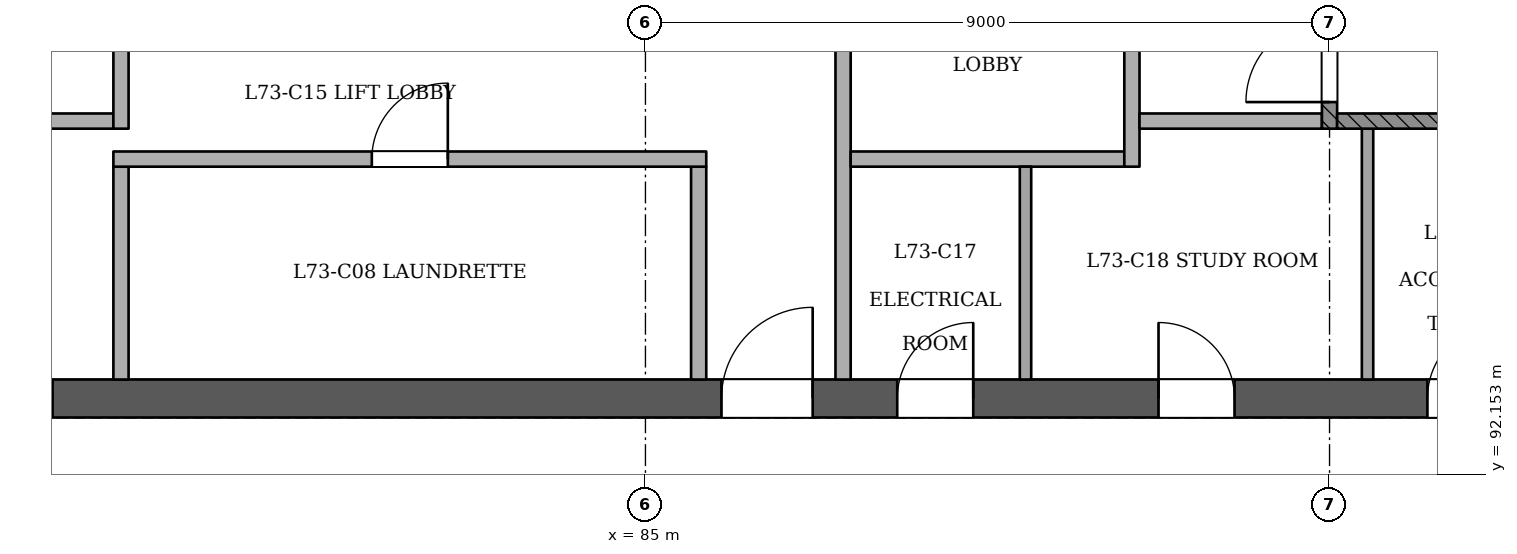
"""IFC4 building model, lengths in metres.
Left out: names, types, materials, properties, quantities, classifications, styles, units other than length and angle.
Written with IfcOpenShell. Run it as: python <this file> out.ifc"""

import sys

from ifc_helpers import new_model, si_unit, direction, frame, frame_2d, origin, place, context, subcontext, project, spatial, rectangle, extrude, element, fill, save


model = new_model("IFC4")
c1 = context("Model", 3, precision=1e-05, world=origin(), true_north=direction((0.0, 1.0)))
c2 = subcontext(c1, "Body", "Model", "MODEL_VIEW")
j1 = project(units=[si_unit("LENGTHUNIT", "METRE"), si_unit("PLANEANGLEUNIT", "RADIAN")], contexts=[c1])
p1 = place(None, origin())
s1 = spatial("IfcSite", under=j1, at=p1, CompositionType="ELEMENT")
p2 = place(p1, origin())
s2 = spatial("IfcBuilding", under=s1, at=p2, CompositionType="ELEMENT")
p3 = place(p2, frame((0.0, 0.0, 282.4)))
s3 = spatial("IfcBuildingStorey", under=s2, at=p3, CompositionType="ELEMENT", Elevation=282.4)
p4 = place(p3, frame((72.75, 93.15, 0.0), z_axis=(0.0, 0.0, 1.0), x_axis=(1.0, 0.0, 0.0)))
e1 = element("IfcWall", 1, at=p4, inside=s3, PredefinedType="SHEAR", context=c2, shape_type="SweptSolid", body=[
    extrude(rectangle(XDim=24.75, YDim=0.5, at=frame_2d((12.375, 0.0))), origin(), (0.0, 0.0, 1.0), 3.6),
])
p5 = place(p4, frame((1.05, 0.0, 0.0)))
e2 = element("IfcOpeningElement", 2, at=p5, cuts=e1, PredefinedType="OPENING", context=c2, shape_type="SweptSolid", body=[
    extrude(rectangle(XDim=1.2, YDim=2.1, at=frame_2d((0.6, 1.05))), frame((0.0, 0.26, 0.0), z_axis=(0.0, -1.0, 0.0), x_axis=(1.0, 0.0, 0.0)), (0.0, 0.0, 1.0), 0.521),
])
p6 = place(p4, frame((3.25, 0.0, 0.0)))
e3 = element("IfcOpeningElement", 3, at=p6, cuts=e1, PredefinedType="OPENING", context=c2, shape_type="SweptSolid", body=[
    extrude(rectangle(XDim=1.2, YDim=2.1, at=frame_2d((0.6, 1.05))), frame((0.0, 0.26, 0.0), z_axis=(0.0, -1.0, 0.0), x_axis=(1.0, 0.0, 0.0)), (0.0, 0.0, 1.0), 0.521),
])
p7 = place(p4, frame((13.25, 0.0, 0.0)))
e4 = element("IfcOpeningElement", 4, at=p7, cuts=e1, PredefinedType="OPENING", context=c2, shape_type="SweptSolid", body=[
    extrude(rectangle(XDim=1.2, YDim=2.1, at=frame_2d((0.6, 1.05))), frame((0.0, 0.26, 0.0), z_axis=(0.0, -1.0, 0.0), x_axis=(1.0, 0.0, 0.0)), (0.0, 0.0, 1.0), 0.521),
])
p8 = place(p4, frame((15.562, 0.0, 0.0)))
e5 = element("IfcOpeningElement", 5, at=p8, cuts=e1, PredefinedType="OPENING", context=c2, shape_type="SweptSolid", body=[
    extrude(rectangle(XDim=1.0, YDim=2.1, at=frame_2d((0.5, 1.05))), frame((0.0, 0.26, 0.0), z_axis=(0.0, -1.0, 0.0), x_axis=(1.0, 0.0, 0.0)), (0.0, 0.0, 1.0), 0.521),
])
p9 = place(p4, frame((19.0, 0.0, 0.0)))
e6 = element("IfcOpeningElement", 6, at=p9, cuts=e1, PredefinedType="OPENING", context=c2, shape_type="SweptSolid", body=[
    extrude(rectangle(XDim=1.0, YDim=2.1, at=frame_2d((0.5, 1.05))), frame((0.0, 0.26, 0.0), z_axis=(0.0, -1.0, 0.0), x_axis=(1.0, 0.0, 0.0)), (0.0, 0.0, 1.0), 0.521),
])
p10 = place(p4, frame((22.538, 0.0, 0.0)))
e7 = element("IfcOpeningElement", 7, at=p10, cuts=e1, PredefinedType="OPENING", context=c2, shape_type="SweptSolid", body=[
    extrude(rectangle(XDim=1.0, YDim=2.1, at=frame_2d((0.5, 1.05))), frame((0.0, 0.26, 0.0), z_axis=(0.0, -1.0, 0.0), x_axis=(1.0, 0.0, 0.0)), (0.0, 0.0, 1.0), 0.521),
])
for number, where, z_axis, x_axis in (
    (8, (78.1, 93.4, 0.0), (0.0, 0.0, 1.0), (0.0, 1.0, 0.0)),
    (9, (85.7, 93.4, 0.0), (0.0, 0.0, 1.0), (0.0, 1.0, 0.0)),
):
    element("IfcWall", number, at=place(p3, frame(where, z_axis=z_axis, x_axis=x_axis)), inside=s3, PredefinedType="PARTITIONING", context=c2, shape_type="SweptSolid", body=[
        extrude(rectangle(XDim=2.8, YDim=0.2, at=frame_2d((1.4, 0.0))), origin(), (0.0, 0.0, 1.0), 3.3),
    ])
p11 = place(p3, frame((87.6, 93.4, 0.0), z_axis=(0.0, 0.0, 1.0), x_axis=(0.0, 1.0, 0.0)))
e10 = element("IfcWall", 10, at=p11, inside=s3, PredefinedType="PARTITIONING", context=c2, shape_type="SweptSolid", body=[
    extrude(rectangle(XDim=7.0, YDim=0.2, at=frame_2d((3.5, 0.0))), origin(), (0.0, 0.0, 1.0), 3.3),
])
p12 = place(p11, frame((4.45, 0.0, 0.0)))
e11 = element("IfcOpeningElement", 11, at=p12, cuts=e10, PredefinedType="OPENING", context=c2, shape_type="SweptSolid", body=[
    extrude(rectangle(XDim=1.1, YDim=2.1, at=frame_2d((0.55, 1.05))), frame((0.0, 0.11, 0.0), z_axis=(0.0, -1.0, 0.0), x_axis=(1.0, 0.0, 0.0)), (0.0, 0.0, 1.0), 0.221),
])
p13 = place(p3, frame((90.0, 93.4, 0.0), z_axis=(0.0, 0.0, 1.0), x_axis=(0.0, 1.0, 0.0)))
e12 = element("IfcWall", 12, at=p13, inside=s3, PredefinedType="PARTITIONING", context=c2, shape_type="SweptSolid", body=[
    extrude(rectangle(XDim=2.8, YDim=0.15, at=frame_2d((1.4, 0.0))), origin(), (0.0, 0.0, 1.0), 3.3),
])
p14 = place(p3, frame((94.5, 93.4, 0.0), z_axis=(0.0, 0.0, 1.0), x_axis=(0.0, 1.0, 0.0)))
e13 = element("IfcWall", 13, at=p14, inside=s3, PredefinedType="PARTITIONING", context=c2, shape_type="SweptSolid", body=[
    extrude(rectangle(XDim=3.3, YDim=0.15, at=frame_2d((1.65, 0.0))), origin(), (0.0, 0.0, 1.0), 3.3),
])
p15 = place(p3, frame((78.0, 96.3, 0.0), z_axis=(0.0, 0.0, 1.0), x_axis=(1.0, 0.0, 0.0)))
e14 = element("IfcWall", 14, at=p15, inside=s3, PredefinedType="PARTITIONING", context=c2, shape_type="SweptSolid", body=[
    extrude(rectangle(XDim=7.8, YDim=0.2, at=frame_2d((3.9, 0.0))), origin(), (0.0, 0.0, 1.0), 3.3),
])
p16 = place(p15, frame((3.4, 0.0, 0.0)))
e15 = element("IfcOpeningElement", 15, at=p16, cuts=e14, PredefinedType="OPENING", context=c2, shape_type="SweptSolid", body=[
    extrude(rectangle(XDim=1.0, YDim=2.1, at=frame_2d((0.5, 1.05))), frame((0.0, 0.11, 0.0), z_axis=(0.0, -1.0, 0.0), x_axis=(1.0, 0.0, 0.0)), (0.0, 0.0, 1.0), 0.221),
])
p17 = place(p3, frame((87.7, 96.3, 0.0), z_axis=(0.0, 0.0, 1.0), x_axis=(1.0, 0.0, 0.0)))
e16 = element("IfcWall", 16, at=p17, inside=s3, PredefinedType="PARTITIONING", context=c2, shape_type="SweptSolid", body=[
    extrude(rectangle(XDim=3.6, YDim=0.2, at=frame_2d((1.8, 0.0))), origin(), (0.0, 0.0, 1.0), 3.3),
])
p18 = place(p3, frame((91.4, 96.2, 0.0), z_axis=(0.0, 0.0, 1.0), x_axis=(0.0, 1.0, 0.0)))
e17 = element("IfcWall", 17, at=p18, inside=s3, PredefinedType="PARTITIONING", context=c2, shape_type="SweptSolid", body=[
    extrude(rectangle(XDim=4.2, YDim=0.2, at=frame_2d((2.1, 0.0))), origin(), (0.0, 0.0, 1.0), 3.3),
])
p19 = place(p18, frame((2.45, 0.0, 0.0)))
e18 = element("IfcOpeningElement", 18, at=p19, cuts=e17, PredefinedType="OPENING", context=c2, shape_type="SweptSolid", body=[
    extrude(rectangle(XDim=1.1, YDim=2.1, at=frame_2d((0.55, 1.05))), frame((0.0, 0.11, 0.0), z_axis=(0.0, -1.0, 0.0), x_axis=(1.0, 0.0, 0.0)), (0.0, 0.0, 1.0), 0.221),
])
p20 = place(p3, frame((76.1, 96.8, 0.0), z_axis=(0.0, 0.0, 1.0), x_axis=(1.0, 0.0, 0.0)))
e19 = element("IfcWall", 19, at=p20, inside=s3, PredefinedType="PARTITIONING", context=c2, shape_type="SweptSolid", body=[
    extrude(rectangle(XDim=1.9, YDim=0.2, at=frame_2d((0.95, 0.0))), origin(), (0.0, 0.0, 1.0), 3.3),
])
p21 = place(p3, frame((78.1, 96.7, 0.0), z_axis=(0.0, 0.0, 1.0), x_axis=(0.0, 1.0, 0.0)))
e20 = element("IfcWall", 20, at=p21, inside=s3, PredefinedType="PARTITIONING", context=c2, shape_type="SweptSolid", body=[
    extrude(rectangle(XDim=3.7, YDim=0.2, at=frame_2d((1.85, 0.0))), origin(), (0.0, 0.0, 1.0), 3.3),
])
p22 = place(p21, frame((1.95, 0.0, 0.0)))
e21 = element("IfcOpeningElement", 21, at=p22, cuts=e20, PredefinedType="OPENING", context=c2, shape_type="SweptSolid", body=[
    extrude(rectangle(XDim=1.1, YDim=2.1, at=frame_2d((0.55, 1.05))), frame((0.0, 0.11, 0.0), z_axis=(0.0, -1.0, 0.0), x_axis=(1.0, 0.0, 0.0)), (0.0, 0.0, 1.0), 0.221),
])
p23 = place(p3, frame((91.5, 96.8, 0.0), z_axis=(0.0, 0.0, 1.0), x_axis=(1.0, 0.0, 0.0)))
e22 = element("IfcWall", 22, at=p23, inside=s3, PredefinedType="PARTITIONING", context=c2, shape_type="SweptSolid", body=[
    extrude(rectangle(XDim=2.4, YDim=0.2, at=frame_2d((1.2, 0.0))), origin(), (0.0, 0.0, 1.0), 3.3),
])
p24 = place(p3, frame((94.0, 96.7, 0.0), z_axis=(0.0, 0.0, 1.0), x_axis=(0.0, 1.0, 0.0)))
e23 = element("IfcWall", 23, at=p24, inside=s3, PredefinedType="SOLIDWALL", context=c2, shape_type="SweptSolid", body=[
    extrude(rectangle(XDim=3.7, YDim=0.2, at=frame_2d((1.85, 0.0))), origin(), (0.0, 0.0, 1.0), 3.3),
])
p25 = place(p24, frame((0.35, 0.0, 0.0)))
e24 = element("IfcOpeningElement", 24, at=p25, cuts=e23, PredefinedType="OPENING", context=c2, shape_type="SweptSolid", body=[
    extrude(rectangle(XDim=1.1, YDim=2.1, at=frame_2d((0.55, 1.05))), frame((0.0, 0.11, 0.0), z_axis=(0.0, -1.0, 0.0), x_axis=(1.0, 0.0, 0.0)), (0.0, 0.0, 1.0), 0.221),
])
p26 = place(p3, frame((94.1, 96.8, 0.0), z_axis=(0.0, 0.0, 1.0), x_axis=(1.0, 0.0, 0.0)))
e25 = element("IfcWall", 25, at=p26, inside=s3, PredefinedType="SOLIDWALL", context=c2, shape_type="SweptSolid", body=[
    extrude(rectangle(XDim=2.9, YDim=0.2, at=frame_2d((1.45, 0.0))), origin(), (0.0, 0.0, 1.0), 3.3),
])
p27 = place(p25, origin())
e26 = element("IfcDoor", 26, at=p27, inside=s3, OperationType="SINGLE_SWING_LEFT", PredefinedType="NOTDEFINED", context=c2, shape_type="SweptSolid", body=[
    extrude(rectangle(XDim=1.1, YDim=2.1, at=frame_2d((0.55, 1.05))), frame((0.0, 0.025, 0.0), z_axis=(0.0, -1.0, 0.0), x_axis=(1.0, 0.0, 0.0)), (0.0, 0.0, 1.0), 0.05),
])
fill(e24, e26)
p28 = place(p6, origin())
e27 = element("IfcDoor", 27, at=p28, inside=s3, OperationType="SINGLE_SWING_LEFT", PredefinedType="NOTDEFINED", context=c2, shape_type="SweptSolid", body=[
    extrude(rectangle(XDim=1.2, YDim=2.1, at=frame_2d((0.6, 1.05))), frame((0.0, 0.025, 0.0), z_axis=(0.0, -1.0, 0.0), x_axis=(1.0, 0.0, 0.0)), (0.0, 0.0, 1.0), 0.05),
])
fill(e3, e27)
p29 = place(p7, origin())
e28 = element("IfcDoor", 28, at=p29, inside=s3, OperationType="SINGLE_SWING_RIGHT", PredefinedType="NOTDEFINED", context=c2, shape_type="SweptSolid", body=[
    extrude(rectangle(XDim=1.2, YDim=2.1, at=frame_2d((0.6, 1.05))), frame((0.0, 0.025, 0.0), z_axis=(0.0, -1.0, 0.0), x_axis=(1.0, 0.0, 0.0)), (0.0, 0.0, 1.0), 0.05),
])
fill(e4, e28)
p30 = place(p8, origin())
e29 = element("IfcDoor", 29, at=p30, inside=s3, OperationType="SINGLE_SWING_RIGHT", PredefinedType="NOTDEFINED", context=c2, shape_type="SweptSolid", body=[
    extrude(rectangle(XDim=1.0, YDim=2.1, at=frame_2d((0.5, 1.05))), frame((0.0, 0.025, 0.0), z_axis=(0.0, -1.0, 0.0), x_axis=(1.0, 0.0, 0.0)), (0.0, 0.0, 1.0), 0.05),
])
fill(e5, e29)
p31 = place(p9, origin())
e30 = element("IfcDoor", 30, at=p31, inside=s3, OperationType="SINGLE_SWING_LEFT", PredefinedType="NOTDEFINED", context=c2, shape_type="SweptSolid", body=[
    extrude(rectangle(XDim=1.0, YDim=2.1, at=frame_2d((0.5, 1.05))), frame((0.0, 0.025, 0.0), z_axis=(0.0, -1.0, 0.0), x_axis=(1.0, 0.0, 0.0)), (0.0, 0.0, 1.0), 0.05),
])
fill(e6, e30)
p32 = place(p10, origin())
e31 = element("IfcDoor", 31, at=p32, inside=s3, OperationType="SINGLE_SWING_RIGHT", PredefinedType="NOTDEFINED", context=c2, shape_type="SweptSolid", body=[
    extrude(rectangle(XDim=1.0, YDim=2.1, at=frame_2d((0.5, 1.05))), frame((0.0, 0.025, 0.0), z_axis=(0.0, -1.0, 0.0), x_axis=(1.0, 0.0, 0.0)), (0.0, 0.0, 1.0), 0.05),
])
fill(e7, e31)
p33 = place(p16, origin())
e32 = element("IfcDoor", 32, at=p33, inside=s3, OperationType="SINGLE_SWING_RIGHT", PredefinedType="NOTDEFINED", context=c2, shape_type="SweptSolid", body=[
    extrude(rectangle(XDim=1.0, YDim=2.1, at=frame_2d((0.5, 1.05))), frame((0.0, 0.025, 0.0), z_axis=(0.0, -1.0, 0.0), x_axis=(1.0, 0.0, 0.0)), (0.0, 0.0, 1.0), 0.05),
])
fill(e15, e32)
save(model, sys.argv[1])
